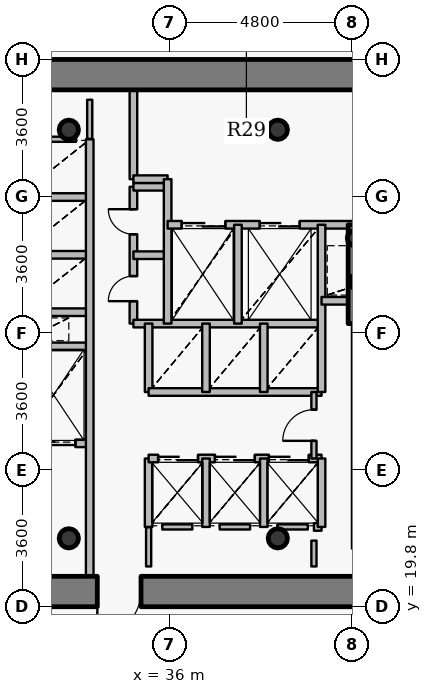
"""IFC4 building model, lengths in metres.
Left out: names, types, materials, properties, quantities, classifications, styles, units other than length and angle.
Written with IfcOpenShell. Run it as: python <this file> out.ifc"""

import sys

from ifc_helpers import new_model, si_unit, direction, frame, frame_2d, origin, origin_2d, place, context, subcontext, project, spatial, rectangle, hollow_circle, extrude, source, transform, mapped, element, fill, save


model = new_model("IFC4")
c1 = context("Model", 3, precision=1e-05, world=origin(), true_north=direction((0.0, 1.0)))
c2 = subcontext(c1, "Body", "Model", "MODEL_VIEW")
j1 = project(units=[si_unit("LENGTHUNIT", "METRE"), si_unit("PLANEANGLEUNIT", "RADIAN")], contexts=[c1])
p1 = place(None, origin())
s1 = spatial("IfcSite", under=j1, at=p1, CompositionType="ELEMENT")
p2 = place(p1, origin())
s2 = spatial("IfcBuilding", under=s1, at=p2, CompositionType="ELEMENT")
p3 = place(p2, frame((0.0, 0.0, 123.45)))
s3 = spatial("IfcBuildingStorey", under=s2, at=p3, CompositionType="ELEMENT", Elevation=123.45)
for number, where, z_axis, x_axis in (
    (1, (33.35, 21.6, 0.0), (0.0, 0.0, 1.0), (1.0, 0.0, 0.0)),
    (2, (38.85, 21.6, 0.0), (0.0, 0.0, 1.0), (1.0, 0.0, 0.0)),
    (3, (38.85, 32.35, 0.0), (0.0, 0.0, 1.0), (1.0, 0.0, 0.0)),
    (4, (33.35, 32.35, 0.0), (0.0, 0.0, 1.0), (1.0, 0.0, 0.0)),
):
    element("IfcColumn", number, at=place(p3, frame(where, z_axis=z_axis, x_axis=x_axis)), inside=s3, PredefinedType="COLUMN", context=c2, shape_type="SweptSolid", body=[
        extrude(hollow_circle(Radius=0.254, WallThickness=0.02, at=origin_2d()), origin(), (0.0, 0.0, 1.0), 3.75),
    ])
for number, where, z_axis, x_axis in (
    (5, (40.95, 28.35, 0.0), (0.0, 0.0, 1.0), (1.0, 0.0, 0.0)),
    (6, (40.88, 29.5, 0.0), (0.0, 0.0, 1.0), (1.0, 0.0, 0.0)),
):
    element("IfcColumn", number, at=place(p3, frame(where, z_axis=z_axis, x_axis=x_axis)), inside=s3, PredefinedType="COLUMN", context=c2, shape_type="SweptSolid", body=[
        extrude(hollow_circle(Radius=0.203, WallThickness=0.016, at=origin_2d()), origin(), (0.0, 0.0, 1.0), 3.75),
    ])
p4 = place(p3, frame((26.6, 33.8, 0.0), z_axis=(0.0, 0.0, 1.0), x_axis=(1.0, 0.0, 0.0)))
e7 = element("IfcWall", 7, at=p4, inside=s3, PredefinedType="SHEAR", context=c2, shape_type="SweptSolid", body=[
    extrude(rectangle(XDim=18.8, YDim=0.8, at=frame_2d((9.4, 0.0))), origin(), (0.0, 0.0, 1.0), 2.95),
])
p5 = place(p3, frame((45.4, 20.2, 0.0), z_axis=(0.0, 0.0, 1.0), x_axis=(-1.0, 0.0, 0.0)))
e8 = element("IfcWall", 8, at=p5, inside=s3, PredefinedType="SHEAR", context=c2, shape_type="SweptSolid", body=[
    extrude(rectangle(XDim=18.8, YDim=0.8, at=frame_2d((9.4, 0.0))), origin(), (0.0, 0.0, 1.0), 2.95),
])
p6 = place(p5, frame((10.15, 0.0, 0.0)))
e9 = element("IfcOpeningElement", 9, at=p6, cuts=e8, PredefinedType="OPENING", context=c2, shape_type="SweptSolid", body=[
    extrude(rectangle(XDim=1.15, YDim=2.15, at=origin_2d()), frame((0.575, 0.41, 1.075), z_axis=(0.0, -1.0, 0.0), x_axis=(1.0, 0.0, 0.0)), (0.0, 0.0, 1.0), 0.82),
])
p7 = place(p3, frame((40.9, 27.25, 0.0), z_axis=(0.0, 0.0, 1.0), x_axis=(0.0, 1.0, 0.0)))
e10 = element("IfcWall", 10, at=p7, inside=s3, PredefinedType="SHEAR", context=c2, shape_type="SweptSolid", body=[
    extrude(rectangle(XDim=2.6, YDim=0.4, at=frame_2d((1.3, 0.0))), origin(), (0.0, 0.0, 1.0), 3.1),
])
p8 = place(p3, frame((32.0, 24.1, 0.0), z_axis=(0.0, 0.0, 1.0), x_axis=(1.0, 0.0, 0.0)))
e11 = element("IfcWall", 11, at=p8, inside=s3, PredefinedType="PARTITIONING", context=c2, shape_type="SweptSolid", body=[
    extrude(rectangle(XDim=1.9, YDim=0.2, at=frame_2d((0.95, 0.0))), origin(), (0.0, 0.0, 1.0), 3.085),
])
p9 = place(p8, frame((0.375, 0.0, 0.0)))
e12 = element("IfcOpeningElement", 12, at=p9, cuts=e11, PredefinedType="OPENING", context=c2, shape_type="SweptSolid", body=[
    extrude(rectangle(XDim=1.15, YDim=2.15, at=origin_2d()), frame((0.575, 0.11, 1.075), z_axis=(0.0, -1.0, 0.0), x_axis=(1.0, 0.0, 0.0)), (0.0, 0.0, 1.0), 0.22),
])
for number, where, z_axis, x_axis in (
    (13, (32.0, 26.65, 0.0), (0.0, 0.0, 1.0), (1.0, 0.0, 0.0)),
    (14, (32.0, 27.55, 0.0), (0.0, 0.0, 1.0), (1.0, 0.0, 0.0)),
    (15, (32.0, 29.06, 0.0), (0.0, 0.0, 1.0), (1.0, 0.0, 0.0)),
    (16, (32.0, 30.58, 0.0), (0.0, 0.0, 1.0), (1.0, 0.0, 0.0)),
):
    element("IfcWall", number, at=place(p3, frame(where, z_axis=z_axis, x_axis=x_axis)), inside=s3, PredefinedType="PARTITIONING", context=c2, shape_type="SweptSolid", body=[
        extrude(rectangle(XDim=1.9, YDim=0.2, at=frame_2d((0.95, 0.0))), origin(), (0.0, 0.0, 1.0), 3.085),
    ])
p10 = place(p3, frame((33.9, 20.6, 0.0), z_axis=(0.0, 0.0, 1.0), x_axis=(0.0, 1.0, 0.0)))
e17 = element("IfcWall", 17, at=p10, inside=s3, PredefinedType="PARTITIONING", context=c2, shape_type="SweptSolid", body=[
    extrude(rectangle(XDim=11.5, YDim=0.2, at=frame_2d((5.75, 0.0))), origin(), (0.0, 0.0, 1.0), 3.085),
])
p11 = place(p3, frame((35.05, 27.25, 0.0), z_axis=(0.0, 0.0, 1.0), x_axis=(0.0, 1.0, 0.0)))
e18 = element("IfcWall", 18, at=p11, inside=s3, PredefinedType="PARTITIONING", context=c2, shape_type="SweptSolid", body=[
    extrude(rectangle(XDim=3.6, YDim=0.2, at=frame_2d((1.8, 0.0))), origin(), (0.0, 0.0, 1.0), 3.5),
])
p12 = place(p11, frame((0.59, 0.0, 0.0)))
e19 = element("IfcOpeningElement", 19, at=p12, cuts=e18, PredefinedType="OPENING", context=c2, shape_type="SweptSolid", body=[
    extrude(rectangle(XDim=0.66, YDim=2.05, at=origin_2d()), frame((0.33, 0.11, 1.025), z_axis=(0.0, -1.0, 0.0), x_axis=(1.0, 0.0, 0.0)), (0.0, 0.0, 1.0), 0.22),
])
p13 = place(p11, frame((2.35, 0.0, 0.0)))
e20 = element("IfcOpeningElement", 20, at=p13, cuts=e18, PredefinedType="OPENING", context=c2, shape_type="SweptSolid", body=[
    extrude(rectangle(XDim=0.66, YDim=2.05, at=origin_2d()), frame((0.33, 0.11, 1.025), z_axis=(0.0, -1.0, 0.0), x_axis=(1.0, 0.0, 0.0)), (0.0, 0.0, 1.0), 0.22),
])
p14 = place(p3, frame((35.05, 27.25, 0.0), z_axis=(0.0, 0.0, 1.0), x_axis=(1.0, 0.0, 0.0)))
e21 = element("IfcWall", 21, at=p14, inside=s3, PredefinedType="PARTITIONING", context=c2, shape_type="SweptSolid", body=[
    extrude(rectangle(XDim=4.95, YDim=0.2, at=frame_2d((2.475, 0.0))), origin(), (0.0, 0.0, 1.0), 3.085),
])
for number, where, z_axis, x_axis in (
    (22, (35.05, 29.05, 0.0), (0.0, 0.0, 1.0), (1.0, 0.0, 0.0)),
    (23, (35.05, 30.85, 0.0), (0.0, 0.0, 1.0), (1.0, 0.0, 0.0)),
):
    element("IfcWall", number, at=place(p3, frame(where, z_axis=z_axis, x_axis=x_axis)), inside=s3, PredefinedType="PARTITIONING", context=c2, shape_type="SweptSolid", body=[
        extrude(rectangle(XDim=0.9, YDim=0.2, at=frame_2d((0.45, 0.0))), origin(), (0.0, 0.0, 1.0), 3.5),
    ])
p15 = place(p3, frame((35.05, 31.05, 0.0), z_axis=(0.0, 0.0, 1.0), x_axis=(0.0, 1.0, 0.0)))
e24 = element("IfcWall", 24, at=p15, inside=s3, PredefinedType="PARTITIONING", context=c2, shape_type="SweptSolid", body=[
    extrude(rectangle(XDim=2.35, YDim=0.2, at=frame_2d((1.175, 0.0))), origin(), (0.0, 0.0, 1.0), 3.085),
])
p16 = place(p3, frame((35.05, 31.05, 0.0), z_axis=(0.0, 0.0, 1.0), x_axis=(1.0, 0.0, 0.0)))
e25 = element("IfcWall", 25, at=p16, inside=s3, PredefinedType="PARTITIONING", context=c2, shape_type="SweptSolid", body=[
    extrude(rectangle(XDim=0.9, YDim=0.2, at=frame_2d((0.45, 0.0))), origin(), (0.0, 0.0, 1.0), 3.5),
])
p17 = place(p3, frame((35.45, 21.9, 0.0), z_axis=(0.0, 0.0, 1.0), x_axis=(0.0, 1.0, 0.0)))
e26 = element("IfcWall", 26, at=p17, inside=s3, PredefinedType="PARTITIONING", context=c2, shape_type="SweptSolid", body=[
    extrude(rectangle(XDim=1.8, YDim=0.2, at=frame_2d((0.9, 0.0))), origin(), (0.0, 0.0, 1.0), 3.5),
])
p18 = place(p3, frame((35.45, 23.7, 0.0), z_axis=(0.0, 0.0, 1.0), x_axis=(1.0, 0.0, 0.0)))
e27 = element("IfcWall", 27, at=p18, inside=s3, PredefinedType="PARTITIONING", context=c2, shape_type="SweptSolid", body=[
    extrude(rectangle(XDim=4.55, YDim=0.2, at=frame_2d((2.275, 0.0))), origin(), (0.0, 0.0, 1.0), 3.085),
])
p19 = place(p18, frame((0.25, 0.0, 0.0)))
e28 = element("IfcOpeningElement", 28, at=p19, cuts=e27, PredefinedType="OPENING", context=c2, shape_type="SweptSolid", body=[
    extrude(rectangle(XDim=1.05, YDim=2.15, at=origin_2d()), frame((0.525, 0.11, 1.075), z_axis=(0.0, -1.0, 0.0), x_axis=(1.0, 0.0, 0.0)), (0.0, 0.0, 1.0), 0.22),
])
p20 = place(p18, frame((1.745, 0.0, 0.0)))
e29 = element("IfcOpeningElement", 29, at=p20, cuts=e27, PredefinedType="OPENING", context=c2, shape_type="SweptSolid", body=[
    extrude(rectangle(XDim=1.05, YDim=2.15, at=origin_2d()), frame((0.525, 0.11, 1.075), z_axis=(0.0, -1.0, 0.0), x_axis=(1.0, 0.0, 0.0)), (0.0, 0.0, 1.0), 0.22),
])
p21 = place(p18, frame((3.165, 0.0, 0.0)))
e30 = element("IfcOpeningElement", 30, at=p21, cuts=e27, PredefinedType="OPENING", context=c2, shape_type="SweptSolid", body=[
    extrude(rectangle(XDim=1.05, YDim=2.15, at=origin_2d()), frame((0.525, 0.11, 1.075), z_axis=(0.0, -1.0, 0.0), x_axis=(1.0, 0.0, 0.0)), (0.0, 0.0, 1.0), 0.22),
])
p22 = place(p3, frame((35.45, 25.45, 0.0), z_axis=(0.0, 0.0, 1.0), x_axis=(0.0, 1.0, 0.0)))
e31 = element("IfcWall", 31, at=p22, inside=s3, PredefinedType="PARTITIONING", context=c2, shape_type="SweptSolid", body=[
    extrude(rectangle(XDim=1.8, YDim=0.2, at=frame_2d((0.9, 0.0))), origin(), (0.0, 0.0, 1.0), 3.5),
])
p23 = place(p3, frame((35.45, 25.45, 0.0), z_axis=(0.0, 0.0, 1.0), x_axis=(1.0, 0.0, 0.0)))
e32 = element("IfcWall", 32, at=p23, inside=s3, PredefinedType="PARTITIONING", context=c2, shape_type="SweptSolid", body=[
    extrude(rectangle(XDim=4.55, YDim=0.2, at=frame_2d((2.275, 0.0))), origin(), (0.0, 0.0, 1.0), 3.085),
])
p24 = place(p3, frame((35.95, 27.25, 0.0), z_axis=(0.0, 0.0, 1.0), x_axis=(0.0, 1.0, 0.0)))
e33 = element("IfcWall", 33, at=p24, inside=s3, PredefinedType="PARTITIONING", context=c2, shape_type="SweptSolid", body=[
    extrude(rectangle(XDim=3.8, YDim=0.2, at=frame_2d((1.9, 0.0))), origin(), (0.0, 0.0, 1.0), 3.5),
])
p25 = place(p3, frame((35.95, 29.85, 0.0), z_axis=(0.0, 0.0, 1.0), x_axis=(1.0, 0.0, 0.0)))
e34 = element("IfcWall", 34, at=p25, inside=s3, PredefinedType="PARTITIONING", context=c2, shape_type="SweptSolid", body=[
    extrude(rectangle(XDim=8.49, YDim=0.2, at=frame_2d((4.245, 0.0))), origin(), (0.0, 0.0, 1.0), 3.085),
])
p26 = place(p25, frame((6.1, 0.0, 0.0)))
e35 = element("IfcOpeningElement", 35, at=p26, cuts=e34, PredefinedType="OPENING", context=c2, shape_type="SweptSolid", body=[
    extrude(rectangle(XDim=1.2, YDim=2.15, at=origin_2d()), frame((0.6, 0.11, 1.075), z_axis=(0.0, -1.0, 0.0), x_axis=(1.0, 0.0, 0.0)), (0.0, 0.0, 1.0), 0.22),
])
p27 = place(p25, frame((0.37, 0.0, 0.0)))
e36 = element("IfcOpeningElement", 36, at=p27, cuts=e34, PredefinedType="OPENING", context=c2, shape_type="SweptSolid", body=[
    extrude(rectangle(XDim=1.15, YDim=2.15, at=origin_2d()), frame((0.575, 0.11, 1.075), z_axis=(0.0, -1.0, 0.0), x_axis=(1.0, 0.0, 0.0)), (0.0, 0.0, 1.0), 0.22),
])
p28 = place(p25, frame((2.425, 0.0, 0.0)))
e37 = element("IfcOpeningElement", 37, at=p28, cuts=e34, PredefinedType="OPENING", context=c2, shape_type="SweptSolid", body=[
    extrude(rectangle(XDim=1.05, YDim=2.15, at=origin_2d()), frame((0.525, 0.11, 1.075), z_axis=(0.0, -1.0, 0.0), x_axis=(1.0, 0.0, 0.0)), (0.0, 0.0, 1.0), 0.22),
])
for number, where, z_axis, x_axis in (
    (38, (36.96, 21.9, 0.0), (0.0, 0.0, 1.0), (0.0, 1.0, 0.0)),
    (39, (36.96, 25.45, 0.0), (0.0, 0.0, 1.0), (0.0, 1.0, 0.0)),
):
    element("IfcWall", number, at=place(p3, frame(where, z_axis=z_axis, x_axis=x_axis)), inside=s3, PredefinedType="PARTITIONING", context=c2, shape_type="SweptSolid", body=[
        extrude(rectangle(XDim=1.8, YDim=0.2, at=frame_2d((0.9, 0.0))), origin(), (0.0, 0.0, 1.0), 3.5),
    ])
p29 = place(p3, frame((37.8, 27.25, 0.0), z_axis=(0.0, 0.0, 1.0), x_axis=(0.0, 1.0, 0.0)))
e40 = element("IfcWall", 40, at=p29, inside=s3, PredefinedType="PARTITIONING", context=c2, shape_type="SweptSolid", body=[
    extrude(rectangle(XDim=2.6, YDim=0.2, at=frame_2d((1.3, 0.0))), origin(), (0.0, 0.0, 1.0), 3.5),
])
for number, where, z_axis, x_axis in (
    (41, (38.48, 21.9, 0.0), (0.0, 0.0, 1.0), (0.0, 1.0, 0.0)),
    (42, (38.48, 25.45, 0.0), (0.0, 0.0, 1.0), (0.0, 1.0, 0.0)),
):
    element("IfcWall", number, at=place(p3, frame(where, z_axis=z_axis, x_axis=x_axis)), inside=s3, PredefinedType="PARTITIONING", context=c2, shape_type="SweptSolid", body=[
        extrude(rectangle(XDim=1.8, YDim=0.2, at=frame_2d((0.9, 0.0))), origin(), (0.0, 0.0, 1.0), 3.5),
    ])
p30 = place(p3, frame((39.8, 21.9, 0.0), z_axis=(0.0, 0.0, 1.0), x_axis=(1.0, 0.0, 0.0)))
e43 = element("IfcWall", 43, at=p30, inside=s3, PredefinedType="PARTITIONING", context=c2, shape_type="SweptSolid", body=[
    extrude(rectangle(XDim=0.2, YDim=0.2, at=frame_2d((0.1, 0.0))), origin(), (0.0, 0.0, 1.0), 3.5),
])
p31 = place(p3, frame((39.8, 23.7, 0.0), z_axis=(0.0, 0.0, 1.0), x_axis=(0.0, 1.0, 0.0)))
e44 = element("IfcWall", 44, at=p31, inside=s3, PredefinedType="PARTITIONING", context=c2, shape_type="SweptSolid", body=[
    extrude(rectangle(XDim=1.75, YDim=0.135, at=frame_2d((0.875, 0.0))), origin(), (0.0, 0.0, 1.0), 3.5),
])
p32 = place(p31, frame((0.465, 0.0, 0.0)))
e45 = element("IfcOpeningElement", 45, at=p32, cuts=e44, PredefinedType="OPENING", context=c2, shape_type="SweptSolid", body=[
    extrude(rectangle(XDim=0.82, YDim=2.1, at=origin_2d()), frame((0.41, 0.078, 1.05), z_axis=(0.0, -1.0, 0.0), x_axis=(1.0, 0.0, 0.0)), (0.0, 0.0, 1.0), 0.155),
])
p33 = place(p3, frame((40.0, 21.9, 0.0), z_axis=(0.0, 0.0, 1.0), x_axis=(0.0, 1.0, 0.0)))
e46 = element("IfcWall", 46, at=p33, inside=s3, PredefinedType="PARTITIONING", context=c2, shape_type="SweptSolid", body=[
    extrude(rectangle(XDim=1.8, YDim=0.2, at=frame_2d((0.9, 0.0))), origin(), (0.0, 0.0, 1.0), 3.5),
])
p34 = place(p3, frame((40.0, 25.45, 0.0), z_axis=(0.0, 0.0, 1.0), x_axis=(0.0, 1.0, 0.0)))
e47 = element("IfcWall", 47, at=p34, inside=s3, PredefinedType="PARTITIONING", context=c2, shape_type="SweptSolid", body=[
    extrude(rectangle(XDim=4.4, YDim=0.2, at=frame_2d((2.2, 0.0))), origin(), (0.0, 0.0, 1.0), 3.5),
])
p35 = place(p3, frame((40.0, 27.85, 0.0), z_axis=(0.0, 0.0, 1.0), x_axis=(1.0, 0.0, 0.0)))
e48 = element("IfcWall", 48, at=p35, inside=s3, PredefinedType="PARTITIONING", context=c2, shape_type="SweptSolid", body=[
    extrude(rectangle(XDim=0.9, YDim=0.2, at=frame_2d((0.45, 0.0))), origin(), (0.0, 0.0, 1.0), 3.5),
])
p36 = place(p3, frame((40.9, 21.33, 0.0), z_axis=(0.0, 0.0, 1.0), x_axis=(0.0, 1.0, 0.0)))
e49 = element("IfcWall", 49, at=p36, inside=s3, PredefinedType="PARTITIONING", context=c2, shape_type="SweptSolid", body=[
    extrude(rectangle(XDim=5.91, YDim=0.2, at=frame_2d((2.955, 0.0))), origin(), (0.0, 0.0, 1.0), 3.035),
])
p37 = place(p3, frame((36.6, 21.9, 0.0), z_axis=(0.0, 0.0, 1.0), x_axis=(-1.0, 0.0, 0.0)))
e50 = element("IfcWall", 50, at=p37, inside=s3, PredefinedType="PARTITIONING", context=c2, shape_type="SweptSolid", body=[
    extrude(rectangle(XDim=0.79, YDim=0.135, at=frame_2d((0.395, 0.0))), origin(), (0.0, 0.0, 1.0), 3.5),
])
p38 = place(p3, frame((38.12, 21.9, 0.0), z_axis=(0.0, 0.0, 1.0), x_axis=(-1.0, 0.0, 0.0)))
e51 = element("IfcWall", 51, at=p38, inside=s3, PredefinedType="PARTITIONING", context=c2, shape_type="SweptSolid", body=[
    extrude(rectangle(XDim=0.8, YDim=0.135, at=frame_2d((0.4, 0.0))), origin(), (0.0, 0.0, 1.0), 3.5),
])
p39 = place(p3, frame((39.64, 21.9, 0.0), z_axis=(0.0, 0.0, 1.0), x_axis=(-1.0, 0.0, 0.0)))
e52 = element("IfcWall", 52, at=p39, inside=s3, PredefinedType="PARTITIONING", context=c2, shape_type="SweptSolid", body=[
    extrude(rectangle(XDim=0.8, YDim=0.135, at=frame_2d((0.4, 0.0))), origin(), (0.0, 0.0, 1.0), 3.085),
])
p40 = place(p3, frame((32.36, 32.1, 0.0), z_axis=(0.0, 0.0, 1.0), x_axis=(1.0, 0.0, 0.0)))
e53 = element("IfcWall", 53, at=p40, inside=s3, PredefinedType="PARTITIONING", context=c2, shape_type="SweptSolid", body=[
    extrude(rectangle(XDim=1.18, YDim=0.135, at=frame_2d((0.59, 0.0))), origin(), (0.0, 0.0, 1.0), 3.085),
])
p41 = place(p3, frame((39.8, 20.86, 0.0), z_axis=(0.0, 0.0, 1.0), x_axis=(0.0, 1.0, 0.0)))
e54 = element("IfcWall", 54, at=p41, inside=s3, PredefinedType="PARTITIONING", context=c2, shape_type="SweptSolid", body=[
    extrude(rectangle(XDim=0.68, YDim=0.135, at=frame_2d((0.34, 0.0))), origin(), (0.0, 0.0, 1.0), 3.035),
])
for number, where, z_axis, x_axis in (
    (55, (35.45, 21.89, 0.0), (0.0, 0.0, 1.0), (0.0, -1.0, 0.0)),
    (56, (33.9, 32.11, 0.0), (0.0, 0.0, 1.0), (0.0, 1.0, 0.0)),
):
    element("IfcWall", number, at=place(p3, frame(where, z_axis=z_axis, x_axis=x_axis)), inside=s3, PredefinedType="PARTITIONING", context=c2, shape_type="SweptSolid", body=[
        extrude(rectangle(XDim=1.03, YDim=0.135, at=frame_2d((0.515, 0.0))), origin(), (0.0, 0.0, 1.0), 3.085),
    ])
m1 = source(origin(), c2, "Body", "SweptSolid", [
    extrude(rectangle(XDim=1.15, YDim=2.15, at=origin_2d()), frame((0.575, 0.025, 1.075), z_axis=(0.0, -1.0, 0.0), x_axis=(1.0, 0.0, 0.0)), (0.0, 0.0, 1.0), 0.05),
])
p42 = place(p6, origin())
e57 = element("IfcDoor", 57, at=p42, inside=s3, OperationType="SINGLE_SWING_RIGHT", PredefinedType="DOOR", context=c2, shape_type="MappedRepresentation", body=[
    mapped(m1, transform((0.0, 0.0, 0.0), x_axis=(1.0, 0.0, 0.0), y_axis=(0.0, 1.0, 0.0), z_axis=(0.0, 0.0, 1.0), scale=1.0)),
])
fill(e9, e57)
m2 = source(origin(), c2, "Body", "SweptSolid", [
    extrude(rectangle(XDim=1.15, YDim=2.15, at=origin_2d()), frame((0.575, 0.025, 1.075), z_axis=(0.0, -1.0, 0.0), x_axis=(1.0, 0.0, 0.0)), (0.0, 0.0, 1.0), 0.05),
])
p43 = place(p27, origin())
e58 = element("IfcDoor", 58, at=p43, inside=s3, OperationType="DOUBLE_DOOR_SLIDING", PredefinedType="USERDEFINED", context=c2, shape_type="MappedRepresentation", body=[
    mapped(m2, transform((0.0, 0.0, 0.0), x_axis=(1.0, 0.0, 0.0), y_axis=(0.0, 1.0, 0.0), z_axis=(0.0, 0.0, 1.0), scale=1.0)),
])
fill(e36, e58)
p44 = place(p9, origin())
e59 = element("IfcDoor", 59, at=p44, inside=s3, OperationType="DOUBLE_DOOR_SLIDING", PredefinedType="USERDEFINED", context=c2, shape_type="MappedRepresentation", body=[
    mapped(m2, transform((0.0, 0.0, 0.0), x_axis=(1.0, 0.0, 0.0), y_axis=(0.0, 1.0, 0.0), z_axis=(0.0, 0.0, 1.0), scale=1.0)),
])
fill(e12, e59)
m3 = source(origin(), c2, "Body", "SweptSolid", [
    extrude(rectangle(XDim=1.05, YDim=2.15, at=origin_2d()), frame((0.525, 0.025, 1.075), z_axis=(0.0, -1.0, 0.0), x_axis=(1.0, 0.0, 0.0)), (0.0, 0.0, 1.0), 0.05),
])
p45 = place(p28, origin())
e60 = element("IfcDoor", 60, at=p45, inside=s3, OperationType="DOUBLE_DOOR_SLIDING", PredefinedType="USERDEFINED", context=c2, shape_type="MappedRepresentation", body=[
    mapped(m3, transform((0.0, 0.0, 0.0), x_axis=(1.0, 0.0, 0.0), y_axis=(0.0, 1.0, 0.0), z_axis=(0.0, 0.0, 1.0), scale=1.0)),
])
fill(e37, e60)
p46 = place(p19, origin())
e61 = element("IfcDoor", 61, at=p46, inside=s3, OperationType="DOUBLE_DOOR_SLIDING", PredefinedType="USERDEFINED", context=c2, shape_type="MappedRepresentation", body=[
    mapped(m3, transform((0.0, 0.0, 0.0), x_axis=(1.0, 0.0, 0.0), y_axis=(0.0, 1.0, 0.0), z_axis=(0.0, 0.0, 1.0), scale=1.0)),
])
fill(e28, e61)
p47 = place(p20, origin())
e62 = element("IfcDoor", 62, at=p47, inside=s3, OperationType="DOUBLE_DOOR_SLIDING", PredefinedType="USERDEFINED", context=c2, shape_type="MappedRepresentation", body=[
    mapped(m3, transform((0.0, 0.0, 0.0), x_axis=(1.0, 0.0, 0.0), y_axis=(0.0, 1.0, 0.0), z_axis=(0.0, 0.0, 1.0), scale=1.0)),
])
fill(e29, e62)
p48 = place(p21, origin())
e63 = element("IfcDoor", 63, at=p48, inside=s3, OperationType="DOUBLE_DOOR_SLIDING", PredefinedType="USERDEFINED", context=c2, shape_type="MappedRepresentation", body=[
    mapped(m3, transform((0.0, 0.0, 0.0), x_axis=(1.0, 0.0, 0.0), y_axis=(0.0, 1.0, 0.0), z_axis=(0.0, 0.0, 1.0), scale=1.0)),
])
fill(e30, e63)
m4 = source(origin(), c2, "Body", "SweptSolid", [
    extrude(rectangle(XDim=0.66, YDim=2.05, at=origin_2d()), frame((0.33, 0.025, 1.025), z_axis=(0.0, -1.0, 0.0), x_axis=(1.0, 0.0, 0.0)), (0.0, 0.0, 1.0), 0.05),
])
p49 = place(p12, origin())
e64 = element("IfcDoor", 64, at=p49, inside=s3, OperationType="SINGLE_SWING_LEFT", PredefinedType="USERDEFINED", context=c2, shape_type="MappedRepresentation", body=[
    mapped(m4, transform((0.0, 0.0, 0.0), x_axis=(1.0, 0.0, 0.0), y_axis=(0.0, 1.0, 0.0), z_axis=(0.0, 0.0, 1.0), scale=1.0)),
])
fill(e19, e64)
p50 = place(p13, origin())
e65 = element("IfcDoor", 65, at=p50, inside=s3, OperationType="SINGLE_SWING_RIGHT", PredefinedType="USERDEFINED", context=c2, shape_type="MappedRepresentation", body=[
    mapped(m4, transform((0.0, 0.0, 0.0), x_axis=(1.0, 0.0, 0.0), y_axis=(0.0, 1.0, 0.0), z_axis=(0.0, 0.0, 1.0), scale=1.0)),
])
fill(e20, e65)
m5 = source(origin(), c2, "Body", "SweptSolid", [
    extrude(rectangle(XDim=0.82, YDim=2.1, at=origin_2d()), frame((0.41, 0.025, 1.05), z_axis=(0.0, -1.0, 0.0), x_axis=(1.0, 0.0, 0.0)), (0.0, 0.0, 1.0), 0.05),
])
p51 = place(p32, origin())
e66 = element("IfcDoor", 66, at=p51, inside=s3, OperationType="SINGLE_SWING_LEFT", PredefinedType="DOOR", context=c2, shape_type="MappedRepresentation", body=[
    mapped(m5, transform((0.0, 0.0, 0.0), x_axis=(1.0, 0.0, 0.0), y_axis=(0.0, 1.0, 0.0), z_axis=(0.0, 0.0, 1.0), scale=1.0)),
])
fill(e45, e66)
save(model, sys.argv[1])
